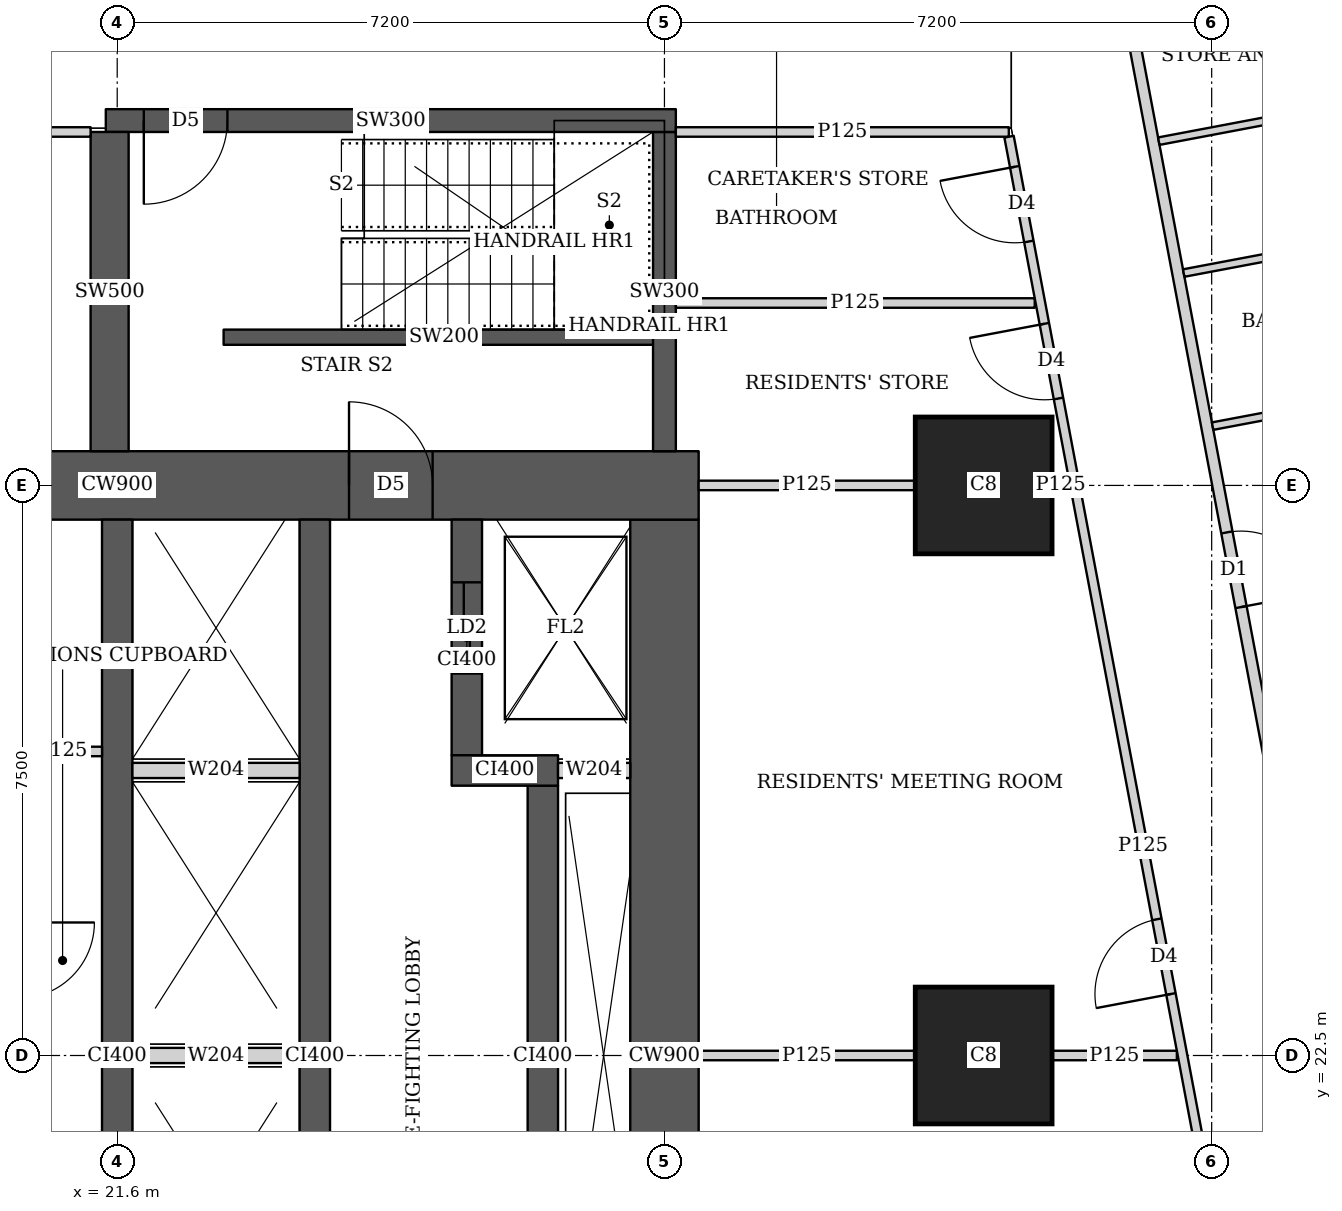
"""IFC4 building model, lengths in metres.
Left out: names, types, materials, properties, quantities, classifications, styles, units other than length and angle.
Written with IfcOpenShell. Run it as: python <this file> out.ifc"""

import sys

from ifc_helpers import new_model, si_unit, direction, frame, frame_2d, origin, origin_2d, place, context, subcontext, project, spatial, rectangle, extrude, element, fill, save


model = new_model("IFC4")
c1 = context("Model", 3, precision=1e-05, world=origin(), true_north=direction((0.0, 1.0)))
c2 = subcontext(c1, "Body", "Model", "MODEL_VIEW")
j1 = project(units=[si_unit("LENGTHUNIT", "METRE"), si_unit("PLANEANGLEUNIT", "RADIAN")], contexts=[c1])
p1 = place(None, origin())
s1 = spatial("IfcSite", under=j1, at=p1, CompositionType="ELEMENT")
p2 = place(p1, origin())
s2 = spatial("IfcBuilding", under=s1, at=p2, CompositionType="ELEMENT")
p3 = place(p2, frame((0.0, 0.0, 65.0)))
s3 = spatial("IfcBuildingStorey", under=s2, at=p3, CompositionType="ELEMENT", Elevation=65.0)
for number, where, z_axis, x_axis in (
    (1, (33.0, 22.5, 0.0), (0.0, 0.0, 1.0), (1.0, 0.0, 0.0)),
    (2, (33.0, 30.0, 0.0), (0.0, 0.0, 1.0), (1.0, 0.0, 0.0)),
):
    element("IfcColumn", number, at=place(p3, frame(where, z_axis=z_axis, x_axis=x_axis)), inside=s3, PredefinedType="COLUMN", context=c2, shape_type="SweptSolid", body=[
        extrude(rectangle(XDim=1.8, YDim=1.8, at=origin_2d()), origin(), (0.0, 0.0, 1.0), 3.75),
    ])
p4 = place(p3, frame((13.95, 30.0, 0.0), z_axis=(0.0, 0.0, 1.0), x_axis=(1.0, 0.0, 0.0)))
e3 = element("IfcWall", 3, at=p4, inside=s3, PredefinedType="SHEAR", context=c2, shape_type="SweptSolid", body=[
    extrude(rectangle(XDim=15.3, YDim=0.9, at=frame_2d((7.65, 0.0))), origin(), (0.0, 0.0, 1.0), 3.75),
])
p5 = place(p4, frame((4.45, 0.0, 0.0)))
e4 = element("IfcOpeningElement", 4, at=p5, cuts=e3, PredefinedType="OPENING", context=c2, shape_type="SweptSolid", body=[
    extrude(rectangle(XDim=1.8, YDim=2.1, at=frame_2d((0.9, 1.05))), frame((0.0, 0.46, 0.0), z_axis=(0.0, -1.0, 0.0), x_axis=(1.0, 0.0, 0.0)), (0.0, 0.0, 1.0), 0.92),
])
p6 = place(p4, frame((10.7, 0.0, 0.0)))
e5 = element("IfcOpeningElement", 5, at=p6, cuts=e3, PredefinedType="OPENING", context=c2, shape_type="SweptSolid", body=[
    extrude(rectangle(XDim=1.1, YDim=2.1, at=frame_2d((0.55, 1.05))), frame((0.0, 0.46, 0.0), z_axis=(0.0, -1.0, 0.0), x_axis=(1.0, 0.0, 0.0)), (0.0, 0.0, 1.0), 0.92),
])
p7 = place(p3, frame((28.8, 15.45, 0.0), z_axis=(0.0, 0.0, 1.0), x_axis=(0.0, 1.0, 0.0)))
e6 = element("IfcWall", 6, at=p7, inside=s3, PredefinedType="SHEAR", context=c2, shape_type="SweptSolid", body=[
    extrude(rectangle(XDim=14.1, YDim=0.9, at=frame_2d((7.05, 0.0))), origin(), (0.0, 0.0, 1.0), 3.75),
])
for number, where, z_axis, x_axis in (
    (7, (21.6, 15.45, 0.0), (0.0, 0.0, 1.0), (0.0, 1.0, 0.0)),
    (8, (24.2, 15.45, 0.0), (0.0, 0.0, 1.0), (0.0, 1.0, 0.0)),
):
    element("IfcWall", number, at=place(p3, frame(where, z_axis=z_axis, x_axis=x_axis)), inside=s3, PredefinedType="SHEAR", context=c2, shape_type="SweptSolid", body=[
        extrude(rectangle(XDim=14.1, YDim=0.4, at=frame_2d((7.05, 0.0))), origin(), (0.0, 0.0, 1.0), 3.75),
    ])
p8 = place(p3, frame((27.2, 18.95, 0.0), z_axis=(0.0, 0.0, 1.0), x_axis=(0.0, 1.0, 0.0)))
e9 = element("IfcWall", 9, at=p8, inside=s3, PredefinedType="SHEAR", context=c2, shape_type="SweptSolid", body=[
    extrude(rectangle(XDim=7.1, YDim=0.4, at=frame_2d((3.55, 0.0))), origin(), (0.0, 0.0, 1.0), 3.75),
])
p9 = place(p3, frame((26.0, 26.25, 0.0), z_axis=(0.0, 0.0, 1.0), x_axis=(1.0, 0.0, 0.0)))
e10 = element("IfcWall", 10, at=p9, inside=s3, PredefinedType="SHEAR", context=c2, shape_type="SweptSolid", body=[
    extrude(rectangle(XDim=1.4, YDim=0.4, at=frame_2d((0.7, 0.0))), origin(), (0.0, 0.0, 1.0), 3.75),
])
p10 = place(p3, frame((26.2, 26.45, 0.0), z_axis=(0.0, 0.0, 1.0), x_axis=(0.0, 1.0, 0.0)))
e11 = element("IfcWall", 11, at=p10, inside=s3, PredefinedType="SHEAR", context=c2, shape_type="SweptSolid", body=[
    extrude(rectangle(XDim=3.1, YDim=0.4, at=frame_2d((1.55, 0.0))), origin(), (0.0, 0.0, 1.0), 3.75),
])
p11 = place(p10, frame((1.075, 0.0, 0.0)))
e12 = element("IfcOpeningElement", 12, at=p11, cuts=e11, PredefinedType="OPENING", context=c2, shape_type="SweptSolid", body=[
    extrude(rectangle(XDim=1.2, YDim=2.1, at=frame_2d((0.6, 1.05))), frame((0.0, 0.21, 0.0), z_axis=(0.0, -1.0, 0.0), x_axis=(1.0, 0.0, 0.0)), (0.0, 0.0, 1.0), 0.42),
])
p12 = place(p3, frame((21.45, 34.8, 0.0), z_axis=(0.0, 0.0, 1.0), x_axis=(1.0, 0.0, 0.0)))
e13 = element("IfcWall", 13, at=p12, inside=s3, PredefinedType="SHEAR", context=c2, shape_type="SweptSolid", body=[
    extrude(rectangle(XDim=7.5, YDim=0.3, at=frame_2d((3.75, 0.0))), origin(), (0.0, 0.0, 1.0), 3.75),
])
p13 = place(p12, frame((0.5, 0.0, 0.0)))
e14 = element("IfcOpeningElement", 14, at=p13, cuts=e13, PredefinedType="OPENING", context=c2, shape_type="SweptSolid", body=[
    extrude(rectangle(XDim=1.1, YDim=2.1, at=frame_2d((0.55, 1.05))), frame((0.0, 0.16, 0.0), z_axis=(0.0, -1.0, 0.0), x_axis=(1.0, 0.0, 0.0)), (0.0, 0.0, 1.0), 0.32),
])
p14 = place(p3, frame((21.5, 30.45, 0.0), z_axis=(0.0, 0.0, 1.0), x_axis=(0.0, 1.0, 0.0)))
e15 = element("IfcWall", 15, at=p14, inside=s3, PredefinedType="SHEAR", context=c2, shape_type="SweptSolid", body=[
    extrude(rectangle(XDim=4.2, YDim=0.5, at=frame_2d((2.1, 0.0))), origin(), (0.0, 0.0, 1.0), 3.75),
])
p15 = place(p3, frame((28.8, 30.45, 0.0), z_axis=(0.0, 0.0, 1.0), x_axis=(0.0, 1.0, 0.0)))
e16 = element("IfcWall", 16, at=p15, inside=s3, PredefinedType="SHEAR", context=c2, shape_type="SweptSolid", body=[
    extrude(rectangle(XDim=4.2, YDim=0.3, at=frame_2d((2.1, 0.0))), origin(), (0.0, 0.0, 1.0), 3.75),
])
p16 = place(p3, frame((33.68, 42.723, 0.0), z_axis=(0.0, 0.0, 1.0), x_axis=(0.185624129307, -0.98262082342, 0.0)))
e17 = element("IfcWall", 17, at=p16, inside=s3, PredefinedType="SOLIDWALL", context=c2, shape_type="SweptSolid", body=[
    extrude(rectangle(XDim=41.051, YDim=0.15, at=frame_2d((20.526, 0.0))), origin(), (0.0, 0.0, 1.0), 2.5),
])
p17 = place(p16, frame((13.577, 0.0, 0.0)))
e18 = element("IfcOpeningElement", 18, at=p17, cuts=e17, PredefinedType="OPENING", context=c2, shape_type="SweptSolid", body=[
    extrude(rectangle(XDim=1.0, YDim=2.1, at=frame_2d((0.5, 1.05))), frame((0.0, 0.085, 0.0), z_axis=(0.0, -1.0, 0.0), x_axis=(1.0, 0.0, 0.0)), (0.0, 0.0, 1.0), 0.17),
])
p18 = place(p16, frame((17.394, 0.0, 0.0)))
e19 = element("IfcOpeningElement", 19, at=p18, cuts=e17, PredefinedType="OPENING", context=c2, shape_type="SweptSolid", body=[
    extrude(rectangle(XDim=1.0, YDim=2.1, at=frame_2d((0.5, 1.05))), frame((0.0, 0.085, 0.0), z_axis=(0.0, -1.0, 0.0), x_axis=(1.0, 0.0, 0.0)), (0.0, 0.0, 1.0), 0.17),
])
p19 = place(p16, frame((26.758, 0.0, 0.0)))
e20 = element("IfcOpeningElement", 20, at=p19, cuts=e17, PredefinedType="OPENING", context=c2, shape_type="SweptSolid", body=[
    extrude(rectangle(XDim=1.0, YDim=2.1, at=frame_2d((0.5, 1.05))), frame((0.0, 0.085, 0.0), z_axis=(0.0, -1.0, 0.0), x_axis=(1.0, 0.0, 0.0)), (0.0, 0.0, 1.0), 0.17),
])
p20 = place(p16, frame((32.193, 0.0, 0.0)))
e21 = element("IfcOpeningElement", 21, at=p20, cuts=e17, PredefinedType="OPENING", context=c2, shape_type="SweptSolid", body=[
    extrude(rectangle(XDim=1.0, YDim=2.1, at=frame_2d((0.5, 1.05))), frame((0.0, 0.085, 0.0), z_axis=(0.0, -1.0, 0.0), x_axis=(1.0, 0.0, 0.0)), (0.0, 0.0, 1.0), 0.17),
])
p21 = place(p3, frame((39.525, 31.443, 0.0), z_axis=(0.0, 0.0, 1.0), x_axis=(-0.982648035033, -0.185480023848, 0.0)))
e22 = element("IfcWall", 22, at=p21, inside=s3, PredefinedType="PARTITIONING", context=c2, shape_type="SweptSolid", body=[
    extrude(rectangle(XDim=3.575, YDim=0.1, at=frame_2d((1.788, 0.0))), origin(), (0.0, 0.0, 1.0), 3.5),
])
p22 = place(p3, frame((38.767, 35.184, 0.0), z_axis=(0.0, 0.0, 1.0), x_axis=(-0.982578451485, -0.185848289414, 0.0)))
e23 = element("IfcWall", 23, at=p22, inside=s3, PredefinedType="PARTITIONING", context=c2, shape_type="SweptSolid", body=[
    extrude(rectangle(XDim=3.525, YDim=0.1, at=frame_2d((1.762, 0.0))), origin(), (0.0, 0.0, 1.0), 3.5),
])
p23 = place(p3, frame((39.095, 33.448, 0.0), z_axis=(0.0, 0.0, 1.0), x_axis=(-0.982626628545, -0.185593396635, 0.0)))
e24 = element("IfcWall", 24, at=p23, inside=s3, PredefinedType="PARTITIONING", context=c2, shape_type="SweptSolid", body=[
    extrude(rectangle(XDim=3.524, YDim=0.1, at=frame_2d((1.762, 0.0))), origin(), (0.0, 0.0, 1.0), 3.5),
])
p24 = place(p3, frame((10.413, 34.65, 0.0), z_axis=(0.0, 0.0, 1.0), x_axis=(1.0, 0.0, 0.0)))
e25 = element("IfcWall", 25, at=p24, inside=s3, PredefinedType="PARTITIONING", context=c2, shape_type="SweptSolid", body=[
    extrude(rectangle(XDim=10.837, YDim=0.125, at=frame_2d((5.418, 0.0))), origin(), (0.0, 0.0, 1.0), 3.5),
])
p25 = place(p24, frame((7.487, 0.0, 0.0)))
e26 = element("IfcOpeningElement", 26, at=p25, cuts=e25, PredefinedType="OPENING", context=c2, shape_type="SweptSolid", body=[
    extrude(rectangle(XDim=1.8, YDim=2.1, at=frame_2d((0.9, 1.05))), frame((0.0, 0.073, 0.0), z_axis=(0.0, -1.0, 0.0), x_axis=(1.0, 0.0, 0.0)), (0.0, 0.0, 1.0), 0.145),
])
p26 = place(p3, frame((28.95, 34.65, 0.0), z_axis=(0.0, 0.0, 1.0), x_axis=(1.0, 0.0, 0.0)))
e27 = element("IfcWall", 27, at=p26, inside=s3, PredefinedType="PARTITIONING", context=c2, shape_type="SweptSolid", body=[
    extrude(rectangle(XDim=4.381, YDim=0.125, at=frame_2d((2.19, 0.0))), origin(), (0.0, 0.0, 1.0), 3.5),
])
p27 = place(p3, frame((36.861, 15.913, 0.0), z_axis=(0.0, 0.0, 1.0), x_axis=(-0.185588307143, 0.982627589808, 0.0)))
e28 = element("IfcWall", 28, at=p27, inside=s3, PredefinedType="PARTITIONING", context=c2, shape_type="SweptSolid", body=[
    extrude(rectangle(XDim=19.005, YDim=0.125, at=frame_2d((9.502, 0.0))), origin(), (0.0, 0.0, 1.0), 2.5),
])
p28 = place(p27, frame((7.527, 0.0, 0.0)))
e29 = element("IfcOpeningElement", 29, at=p28, cuts=e28, PredefinedType="OPENING", context=c2, shape_type="SweptSolid", body=[
    extrude(rectangle(XDim=1.0, YDim=2.1, at=frame_2d((0.5, 1.05))), frame((0.0, 0.073, 0.0), z_axis=(0.0, -1.0, 0.0), x_axis=(1.0, 0.0, 0.0)), (0.0, 0.0, 1.0), 0.145),
])
p29 = place(p27, frame((15.5, 0.0, 0.0)))
e30 = element("IfcOpeningElement", 30, at=p29, cuts=e28, PredefinedType="OPENING", context=c2, shape_type="SweptSolid", body=[
    extrude(rectangle(XDim=1.0, YDim=2.1, at=frame_2d((0.5, 1.05))), frame((0.0, 0.073, 0.0), z_axis=(0.0, -1.0, 0.0), x_axis=(1.0, 0.0, 0.0)), (0.0, 0.0, 1.0), 0.145),
])
p30 = place(p27, frame((17.602, 0.0, 0.0)))
e31 = element("IfcOpeningElement", 31, at=p30, cuts=e28, PredefinedType="OPENING", context=c2, shape_type="SweptSolid", body=[
    extrude(rectangle(XDim=1.0, YDim=2.1, at=frame_2d((0.5, 1.05))), frame((0.0, 0.073, 0.0), z_axis=(0.0, -1.0, 0.0), x_axis=(1.0, 0.0, 0.0)), (0.0, 0.0, 1.0), 0.145),
])
p31 = place(p3, frame((29.25, 22.5, 0.0), z_axis=(0.0, 0.0, 1.0), x_axis=(1.0, 0.0, 0.0)))
e32 = element("IfcWall", 32, at=p31, inside=s3, PredefinedType="PARTITIONING", context=c2, shape_type="SweptSolid", body=[
    extrude(rectangle(XDim=2.849, YDim=0.125, at=frame_2d((1.425, 0.0))), origin(), (0.0, 0.0, 1.0), 3.5),
])
p32 = place(p3, frame((33.901, 22.5, 0.0), z_axis=(0.0, 0.0, 1.0), x_axis=(1.0, 0.0, 0.0)))
e33 = element("IfcWall", 33, at=p32, inside=s3, PredefinedType="PARTITIONING", context=c2, shape_type="SweptSolid", body=[
    extrude(rectangle(XDim=1.641, YDim=0.125, at=frame_2d((0.821, 0.0))), origin(), (0.0, 0.0, 1.0), 2.5),
])
p33 = place(p3, frame((29.25, 30.0, 0.0), z_axis=(0.0, 0.0, 1.0), x_axis=(1.0, 0.0, 0.0)))
e34 = element("IfcWall", 34, at=p33, inside=s3, PredefinedType="PARTITIONING", context=c2, shape_type="SweptSolid", body=[
    extrude(rectangle(XDim=2.849, YDim=0.125, at=frame_2d((1.425, 0.0))), origin(), (0.0, 0.0, 1.0), 3.5),
])
p34 = place(p3, frame((33.901, 30.0, 0.0), z_axis=(0.0, 0.0, 1.0), x_axis=(1.0, 0.0, 0.0)))
e35 = element("IfcWall", 35, at=p34, inside=s3, PredefinedType="PARTITIONING", context=c2, shape_type="SweptSolid", body=[
    extrude(rectangle(XDim=0.224, YDim=0.125, at=frame_2d((0.112, 0.0))), origin(), (0.0, 0.0, 1.0), 2.5),
])
p35 = place(p3, frame((28.95, 32.4, 0.0), z_axis=(0.0, 0.0, 1.0), x_axis=(1.0, 0.0, 0.0)))
e36 = element("IfcWall", 36, at=p35, inside=s3, PredefinedType="PARTITIONING", context=c2, shape_type="SweptSolid", body=[
    extrude(rectangle(XDim=4.722, YDim=0.125, at=frame_2d((2.361, 0.0))), origin(), (0.0, 0.0, 1.0), 3.5),
])
p36 = place(p3, frame((20.363, 26.5, 0.0), z_axis=(0.0, 0.0, 1.0), x_axis=(1.0, 0.0, 0.0)))
e37 = element("IfcWall", 37, at=p36, inside=s3, PredefinedType="PARTITIONING", context=c2, shape_type="SweptSolid", body=[
    extrude(rectangle(XDim=1.037, YDim=0.125, at=frame_2d((0.519, 0.0))), origin(), (0.0, 0.0, 1.0), 3.5),
])
p37 = place(p3, frame((23.0, 31.95, 0.0), z_axis=(0.0, 0.0, 1.0), x_axis=(1.0, 0.0, 0.0)))
e38 = element("IfcWall", 38, at=p37, inside=s3, PredefinedType="SHEAR", context=c2, shape_type="SweptSolid", body=[
    extrude(rectangle(XDim=5.8, YDim=0.2, at=frame_2d((2.9, 0.0))), origin(), (0.0, 0.0, 1.0), 3.75),
])
for number, where, z_axis, x_axis in (
    (39, (21.8, 22.5, 0.0), (0.0, 0.0, 1.0), (1.0, 0.0, 0.0)),
    (40, (21.8, 26.25, 0.0), (0.0, 0.0, 1.0), (1.0, 0.0, 0.0)),
):
    element("IfcWall", number, at=place(p3, frame(where, z_axis=z_axis, x_axis=x_axis)), inside=s3, PredefinedType="SOLIDWALL", context=c2, shape_type="SweptSolid", body=[
        extrude(rectangle(XDim=2.2, YDim=0.2, at=frame_2d((1.1, 0.0))), origin(), (0.0, 0.0, 1.0), 3.5),
    ])
p38 = place(p3, frame((27.4, 26.25, 0.0), z_axis=(0.0, 0.0, 1.0), x_axis=(1.0, 0.0, 0.0)))
e41 = element("IfcWall", 41, at=p38, inside=s3, PredefinedType="SOLIDWALL", context=c2, shape_type="SweptSolid", body=[
    extrude(rectangle(XDim=0.95, YDim=0.2, at=frame_2d((0.475, 0.0))), origin(), (0.0, 0.0, 1.0), 3.5),
])
p39 = place(p17, origin())
e42 = element("IfcDoor", 42, at=p39, inside=s3, OperationType="SINGLE_SWING_RIGHT", PredefinedType="DOOR", context=c2, shape_type="SweptSolid", body=[
    extrude(rectangle(XDim=1.0, YDim=2.1, at=frame_2d((0.5, 1.05))), frame((0.0, 0.025, 0.0), z_axis=(0.0, -1.0, 0.0), x_axis=(1.0, 0.0, 0.0)), (0.0, 0.0, 1.0), 0.05),
])
fill(e18, e42)
p40 = place(p28, origin())
e43 = element("IfcDoor", 43, at=p40, inside=s3, OperationType="SINGLE_SWING_LEFT", PredefinedType="DOOR", context=c2, shape_type="SweptSolid", body=[
    extrude(rectangle(XDim=1.0, YDim=2.1, at=frame_2d((0.5, 1.05))), frame((0.0, 0.025, 0.0), z_axis=(0.0, -1.0, 0.0), x_axis=(1.0, 0.0, 0.0)), (0.0, 0.0, 1.0), 0.05),
])
fill(e29, e43)
p41 = place(p29, origin())
e44 = element("IfcDoor", 44, at=p41, inside=s3, OperationType="SINGLE_SWING_RIGHT", PredefinedType="DOOR", context=c2, shape_type="SweptSolid", body=[
    extrude(rectangle(XDim=1.0, YDim=2.1, at=frame_2d((0.5, 1.05))), frame((0.0, 0.025, 0.0), z_axis=(0.0, -1.0, 0.0), x_axis=(1.0, 0.0, 0.0)), (0.0, 0.0, 1.0), 0.05),
])
fill(e30, e44)
p42 = place(p30, origin())
e45 = element("IfcDoor", 45, at=p42, inside=s3, OperationType="SINGLE_SWING_RIGHT", PredefinedType="DOOR", context=c2, shape_type="SweptSolid", body=[
    extrude(rectangle(XDim=1.0, YDim=2.1, at=frame_2d((0.5, 1.05))), frame((0.0, 0.025, 0.0), z_axis=(0.0, -1.0, 0.0), x_axis=(1.0, 0.0, 0.0)), (0.0, 0.0, 1.0), 0.05),
])
fill(e31, e45)
p43 = place(p6, origin())
e46 = element("IfcDoor", 46, at=p43, inside=s3, OperationType="SINGLE_SWING_LEFT", PredefinedType="DOOR", context=c2, shape_type="SweptSolid", body=[
    extrude(rectangle(XDim=1.1, YDim=2.1, at=frame_2d((0.55, 1.05))), frame((0.0, 0.025, 0.0), z_axis=(0.0, -1.0, 0.0), x_axis=(1.0, 0.0, 0.0)), (0.0, 0.0, 1.0), 0.05),
])
fill(e5, e46)
p44 = place(p11, origin())
e47 = element("IfcDoor", 47, at=p44, inside=s3, OperationType="DOUBLE_DOOR_SLIDING", PredefinedType="DOOR", context=c2, shape_type="SweptSolid", body=[
    extrude(rectangle(XDim=1.2, YDim=2.1, at=frame_2d((0.6, 1.05))), frame((0.0, 0.025, 0.0), z_axis=(0.0, -1.0, 0.0), x_axis=(1.0, 0.0, 0.0)), (0.0, 0.0, 1.0), 0.05),
])
fill(e12, e47)
p45 = place(p13, origin())
e48 = element("IfcDoor", 48, at=p45, inside=s3, OperationType="SINGLE_SWING_RIGHT", PredefinedType="DOOR", context=c2, shape_type="SweptSolid", body=[
    extrude(rectangle(XDim=1.1, YDim=2.1, at=frame_2d((0.55, 1.05))), frame((0.0, 0.025, 0.0), z_axis=(0.0, -1.0, 0.0), x_axis=(1.0, 0.0, 0.0)), (0.0, 0.0, 1.0), 0.05),
])
fill(e14, e48)
save(model, sys.argv[1])
